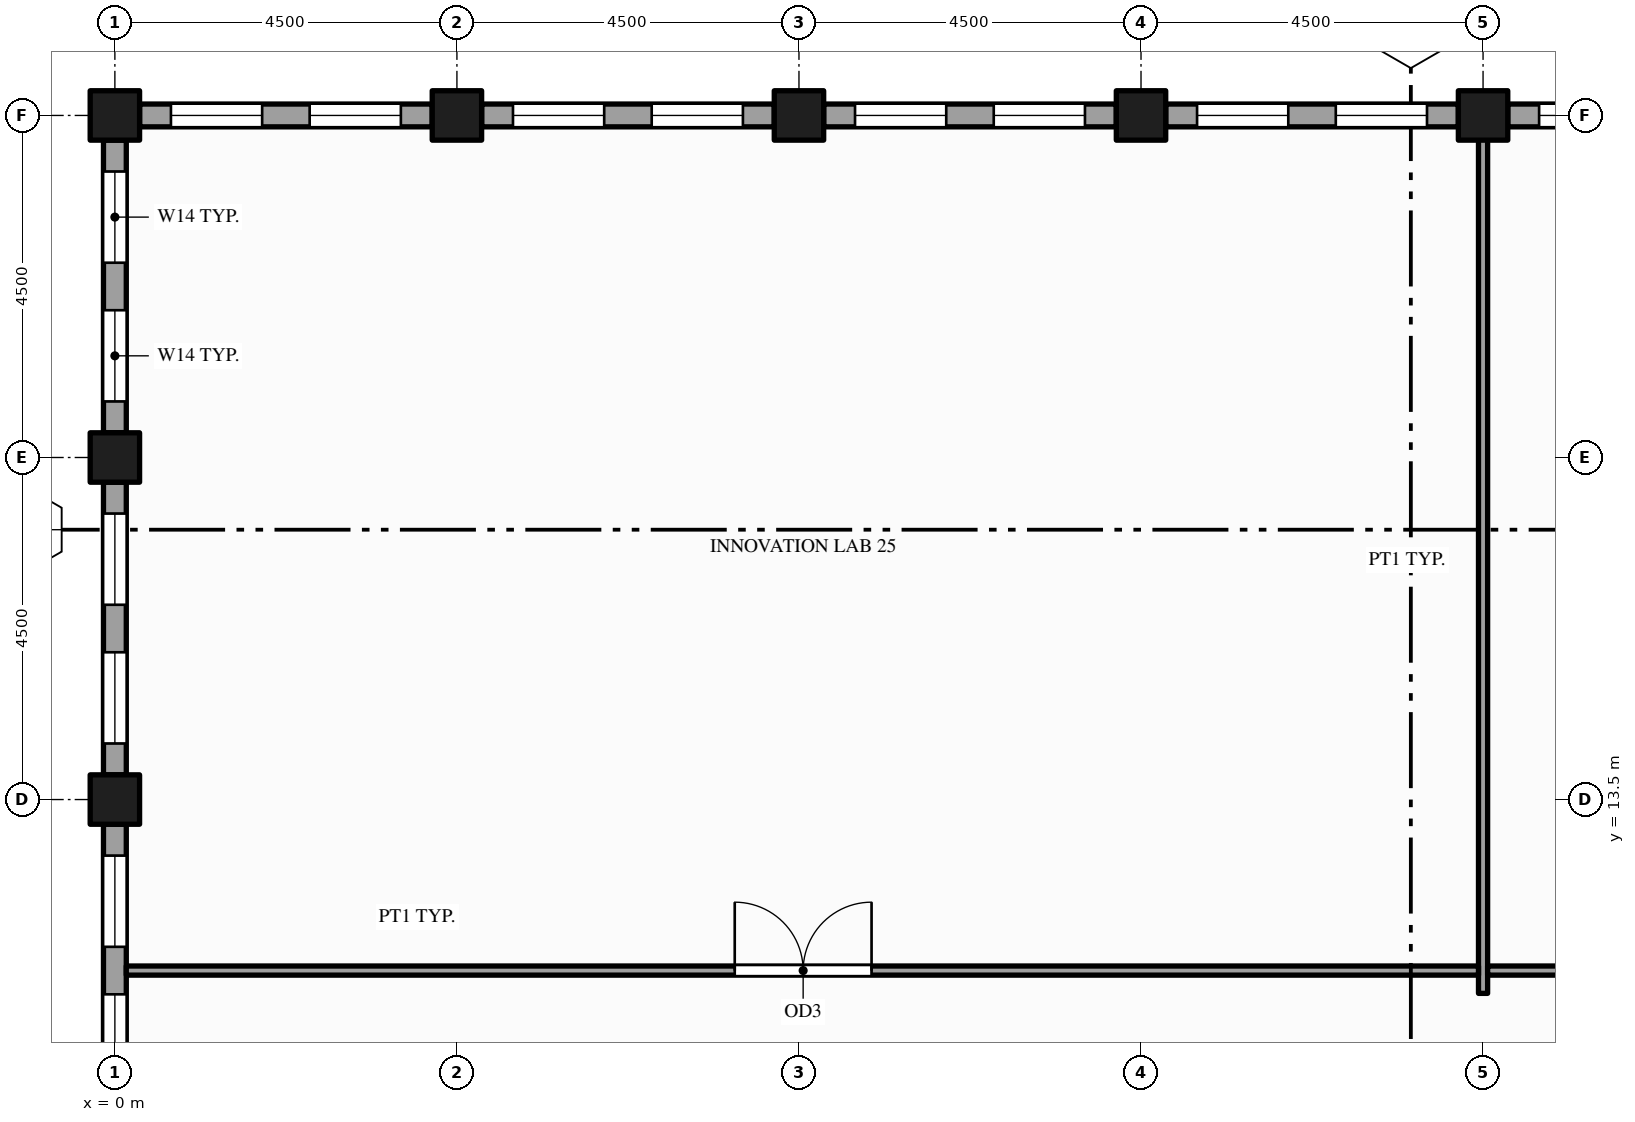
"""IFC4 building model, lengths in metres.
Left out: names, types, materials, properties, quantities, classifications, styles, units other than length and angle.
Written with IfcOpenShell. Run it as: python <this file> out.ifc"""

import sys

from ifc_helpers import new_model, si_unit, direction, frame, frame_2d, origin, origin_2d, place, context, subcontext, project, spatial, rectangle, hollow_rectangle, extrude, element, fill, save


model = new_model("IFC4")
c1 = context("Model", 3, precision=1e-05, world=origin(), true_north=direction((0.0, 1.0)))
c2 = subcontext(c1, "Body", "Model", "MODEL_VIEW")
j1 = project(units=[si_unit("LENGTHUNIT", "METRE"), si_unit("PLANEANGLEUNIT", "RADIAN")], contexts=[c1])
p1 = place(None, origin())
s1 = spatial("IfcSite", under=j1, at=p1, CompositionType="ELEMENT")
p2 = place(p1, origin())
s2 = spatial("IfcBuilding", under=s1, at=p2, CompositionType="ELEMENT")
p3 = place(p2, frame((0.0, 0.0, 249.0)))
s3 = spatial("IfcBuildingStorey", under=s2, at=p3, CompositionType="ELEMENT", Elevation=249.0)
for number, where, z_axis, x_axis in (
    (1, (0.0, 13.5, -0.15), (0.0, 0.0, 1.0), (1.0, 0.0, 0.0)),
    (2, (0.0, 18.0, -0.15), (0.0, 0.0, 1.0), (1.0, 0.0, 0.0)),
    (3, (0.0, 22.5, -0.15), (0.0, 0.0, 1.0), (1.0, 0.0, 0.0)),
    (4, (4.5, 22.5, -0.15), (0.0, 0.0, 1.0), (1.0, 0.0, 0.0)),
    (5, (9.0, 22.5, -0.15), (0.0, 0.0, 1.0), (1.0, 0.0, 0.0)),
    (6, (13.5, 22.5, -0.15), (0.0, 0.0, 1.0), (1.0, 0.0, 0.0)),
    (7, (18.0, 22.5, -0.15), (0.0, 0.0, 1.0), (1.0, 0.0, 0.0)),
):
    element("IfcColumn", number, at=place(p3, frame(where, z_axis=z_axis, x_axis=x_axis)), inside=s3, PredefinedType="COLUMN", context=c2, shape_type="SweptSolid", body=[
        extrude(hollow_rectangle(XDim=0.65, YDim=0.65, WallThickness=0.032, at=origin_2d()), origin(), (0.0, 0.0, 1.0), 4.0),
    ])
p4 = place(p3, frame((22.175, 22.5, 0.0), z_axis=(0.0, 0.0, 1.0), x_axis=(-1.0, 0.0, 0.0)))
e8 = element("IfcWall", 8, at=p4, inside=s3, PredefinedType="STANDARD", context=c2, shape_type="SweptSolid", body=[
    extrude(rectangle(XDim=3.85, YDim=0.3, at=frame_2d((1.925, 0.0))), origin(), (0.0, 0.0, 1.0), 2.87),
])
p5 = place(p4, frame((0.413, 0.0, 0.9)))
e9 = element("IfcOpeningElement", 9, at=p5, cuts=e8, PredefinedType="OPENING", context=c2, shape_type="SweptSolid", body=[
    extrude(rectangle(XDim=1.2, YDim=1.75, at=frame_2d((0.6, 0.875))), frame((0.0, 0.16, 0.0), z_axis=(0.0, -1.0, 0.0), x_axis=(1.0, 0.0, 0.0)), (0.0, 0.0, 1.0), 0.32),
])
p6 = place(p4, frame((2.238, 0.0, 0.9)))
e10 = element("IfcOpeningElement", 10, at=p6, cuts=e8, PredefinedType="OPENING", context=c2, shape_type="SweptSolid", body=[
    extrude(rectangle(XDim=1.2, YDim=1.75, at=frame_2d((0.6, 0.875))), frame((0.0, 0.16, 0.0), z_axis=(0.0, -1.0, 0.0), x_axis=(1.0, 0.0, 0.0)), (0.0, 0.0, 1.0), 0.32),
])
p7 = place(p3, frame((17.675, 22.5, 0.0), z_axis=(0.0, 0.0, 1.0), x_axis=(-1.0, 0.0, 0.0)))
e11 = element("IfcWall", 11, at=p7, inside=s3, PredefinedType="STANDARD", context=c2, shape_type="SweptSolid", body=[
    extrude(rectangle(XDim=3.85, YDim=0.3, at=frame_2d((1.925, 0.0))), origin(), (0.0, 0.0, 1.0), 2.87),
])
p8 = place(p7, frame((0.413, 0.0, 0.9)))
e12 = element("IfcOpeningElement", 12, at=p8, cuts=e11, PredefinedType="OPENING", context=c2, shape_type="SweptSolid", body=[
    extrude(rectangle(XDim=1.2, YDim=1.75, at=frame_2d((0.6, 0.875))), frame((0.0, 0.16, 0.0), z_axis=(0.0, -1.0, 0.0), x_axis=(1.0, 0.0, 0.0)), (0.0, 0.0, 1.0), 0.32),
])
p9 = place(p7, frame((2.238, 0.0, 0.9)))
e13 = element("IfcOpeningElement", 13, at=p9, cuts=e11, PredefinedType="OPENING", context=c2, shape_type="SweptSolid", body=[
    extrude(rectangle(XDim=1.2, YDim=1.75, at=frame_2d((0.6, 0.875))), frame((0.0, 0.16, 0.0), z_axis=(0.0, -1.0, 0.0), x_axis=(1.0, 0.0, 0.0)), (0.0, 0.0, 1.0), 0.32),
])
p10 = place(p3, frame((13.175, 22.5, 0.0), z_axis=(0.0, 0.0, 1.0), x_axis=(-1.0, 0.0, 0.0)))
e14 = element("IfcWall", 14, at=p10, inside=s3, PredefinedType="STANDARD", context=c2, shape_type="SweptSolid", body=[
    extrude(rectangle(XDim=3.85, YDim=0.3, at=frame_2d((1.925, 0.0))), origin(), (0.0, 0.0, 1.0), 2.87),
])
p11 = place(p10, frame((0.413, 0.0, 0.9)))
e15 = element("IfcOpeningElement", 15, at=p11, cuts=e14, PredefinedType="OPENING", context=c2, shape_type="SweptSolid", body=[
    extrude(rectangle(XDim=1.2, YDim=1.75, at=frame_2d((0.6, 0.875))), frame((0.0, 0.16, 0.0), z_axis=(0.0, -1.0, 0.0), x_axis=(1.0, 0.0, 0.0)), (0.0, 0.0, 1.0), 0.32),
])
p12 = place(p10, frame((2.238, 0.0, 0.9)))
e16 = element("IfcOpeningElement", 16, at=p12, cuts=e14, PredefinedType="OPENING", context=c2, shape_type="SweptSolid", body=[
    extrude(rectangle(XDim=1.2, YDim=1.75, at=frame_2d((0.6, 0.875))), frame((0.0, 0.16, 0.0), z_axis=(0.0, -1.0, 0.0), x_axis=(1.0, 0.0, 0.0)), (0.0, 0.0, 1.0), 0.32),
])
p13 = place(p3, frame((8.675, 22.5, 0.0), z_axis=(0.0, 0.0, 1.0), x_axis=(-1.0, 0.0, 0.0)))
e17 = element("IfcWall", 17, at=p13, inside=s3, PredefinedType="STANDARD", context=c2, shape_type="SweptSolid", body=[
    extrude(rectangle(XDim=3.85, YDim=0.3, at=frame_2d((1.925, 0.0))), origin(), (0.0, 0.0, 1.0), 2.87),
])
p14 = place(p13, frame((0.413, 0.0, 0.9)))
e18 = element("IfcOpeningElement", 18, at=p14, cuts=e17, PredefinedType="OPENING", context=c2, shape_type="SweptSolid", body=[
    extrude(rectangle(XDim=1.2, YDim=1.75, at=frame_2d((0.6, 0.875))), frame((0.0, 0.16, 0.0), z_axis=(0.0, -1.0, 0.0), x_axis=(1.0, 0.0, 0.0)), (0.0, 0.0, 1.0), 0.32),
])
p15 = place(p13, frame((2.238, 0.0, 0.9)))
e19 = element("IfcOpeningElement", 19, at=p15, cuts=e17, PredefinedType="OPENING", context=c2, shape_type="SweptSolid", body=[
    extrude(rectangle(XDim=1.2, YDim=1.75, at=frame_2d((0.6, 0.875))), frame((0.0, 0.16, 0.0), z_axis=(0.0, -1.0, 0.0), x_axis=(1.0, 0.0, 0.0)), (0.0, 0.0, 1.0), 0.32),
])
p16 = place(p3, frame((4.175, 22.5, 0.0), z_axis=(0.0, 0.0, 1.0), x_axis=(-1.0, 0.0, 0.0)))
e20 = element("IfcWall", 20, at=p16, inside=s3, PredefinedType="STANDARD", context=c2, shape_type="SweptSolid", body=[
    extrude(rectangle(XDim=3.85, YDim=0.3, at=frame_2d((1.925, 0.0))), origin(), (0.0, 0.0, 1.0), 2.87),
])
p17 = place(p16, frame((0.413, 0.0, 0.9)))
e21 = element("IfcOpeningElement", 21, at=p17, cuts=e20, PredefinedType="OPENING", context=c2, shape_type="SweptSolid", body=[
    extrude(rectangle(XDim=1.2, YDim=1.75, at=frame_2d((0.6, 0.875))), frame((0.0, 0.16, 0.0), z_axis=(0.0, -1.0, 0.0), x_axis=(1.0, 0.0, 0.0)), (0.0, 0.0, 1.0), 0.32),
])
p18 = place(p16, frame((2.238, 0.0, 0.9)))
e22 = element("IfcOpeningElement", 22, at=p18, cuts=e20, PredefinedType="OPENING", context=c2, shape_type="SweptSolid", body=[
    extrude(rectangle(XDim=1.2, YDim=1.75, at=frame_2d((0.6, 0.875))), frame((0.0, 0.16, 0.0), z_axis=(0.0, -1.0, 0.0), x_axis=(1.0, 0.0, 0.0)), (0.0, 0.0, 1.0), 0.32),
])
p19 = place(p3, frame((0.0, 22.175, 0.0), z_axis=(0.0, 0.0, 1.0), x_axis=(0.0, -1.0, 0.0)))
e23 = element("IfcWall", 23, at=p19, inside=s3, PredefinedType="STANDARD", context=c2, shape_type="SweptSolid", body=[
    extrude(rectangle(XDim=3.85, YDim=0.3, at=frame_2d((1.925, 0.0))), origin(), (0.0, 0.0, 1.0), 3.162),
])
p20 = place(p19, frame((0.413, 0.0, 0.9)))
e24 = element("IfcOpeningElement", 24, at=p20, cuts=e23, PredefinedType="OPENING", context=c2, shape_type="SweptSolid", body=[
    extrude(rectangle(XDim=1.2, YDim=2.0, at=frame_2d((0.6, 1.0))), frame((0.0, 0.16, 0.0), z_axis=(0.0, -1.0, 0.0), x_axis=(1.0, 0.0, 0.0)), (0.0, 0.0, 1.0), 0.32),
])
p21 = place(p19, frame((2.238, 0.0, 0.9)))
e25 = element("IfcOpeningElement", 25, at=p21, cuts=e23, PredefinedType="OPENING", context=c2, shape_type="SweptSolid", body=[
    extrude(rectangle(XDim=1.2, YDim=2.0, at=frame_2d((0.6, 1.0))), frame((0.0, 0.16, 0.0), z_axis=(0.0, -1.0, 0.0), x_axis=(1.0, 0.0, 0.0)), (0.0, 0.0, 1.0), 0.32),
])
p22 = place(p3, frame((0.0, 17.675, 0.0), z_axis=(0.0, 0.0, 1.0), x_axis=(0.0, -1.0, 0.0)))
e26 = element("IfcWall", 26, at=p22, inside=s3, PredefinedType="STANDARD", context=c2, shape_type="SweptSolid", body=[
    extrude(rectangle(XDim=3.85, YDim=0.3, at=frame_2d((1.925, 0.0))), origin(), (0.0, 0.0, 1.0), 3.162),
])
p23 = place(p22, frame((0.413, 0.0, 0.9)))
e27 = element("IfcOpeningElement", 27, at=p23, cuts=e26, PredefinedType="OPENING", context=c2, shape_type="SweptSolid", body=[
    extrude(rectangle(XDim=1.2, YDim=2.0, at=frame_2d((0.6, 1.0))), frame((0.0, 0.16, 0.0), z_axis=(0.0, -1.0, 0.0), x_axis=(1.0, 0.0, 0.0)), (0.0, 0.0, 1.0), 0.32),
])
p24 = place(p22, frame((2.238, 0.0, 0.9)))
e28 = element("IfcOpeningElement", 28, at=p24, cuts=e26, PredefinedType="OPENING", context=c2, shape_type="SweptSolid", body=[
    extrude(rectangle(XDim=1.2, YDim=2.0, at=frame_2d((0.6, 1.0))), frame((0.0, 0.16, 0.0), z_axis=(0.0, -1.0, 0.0), x_axis=(1.0, 0.0, 0.0)), (0.0, 0.0, 1.0), 0.32),
])
p25 = place(p3, frame((0.0, 13.175, 0.0), z_axis=(0.0, 0.0, 1.0), x_axis=(0.0, -1.0, 0.0)))
e29 = element("IfcWall", 29, at=p25, inside=s3, PredefinedType="STANDARD", context=c2, shape_type="SweptSolid", body=[
    extrude(rectangle(XDim=3.85, YDim=0.3, at=frame_2d((1.925, 0.0))), origin(), (0.0, 0.0, 1.0), 3.162),
])
p26 = place(p25, frame((0.413, 0.0, 0.9)))
e30 = element("IfcOpeningElement", 30, at=p26, cuts=e29, PredefinedType="OPENING", context=c2, shape_type="SweptSolid", body=[
    extrude(rectangle(XDim=1.2, YDim=2.0, at=frame_2d((0.6, 1.0))), frame((0.0, 0.16, 0.0), z_axis=(0.0, -1.0, 0.0), x_axis=(1.0, 0.0, 0.0)), (0.0, 0.0, 1.0), 0.32),
])
p27 = place(p25, frame((2.238, 0.0, 0.9)))
e31 = element("IfcOpeningElement", 31, at=p27, cuts=e29, PredefinedType="OPENING", context=c2, shape_type="SweptSolid", body=[
    extrude(rectangle(XDim=1.2, YDim=2.0, at=frame_2d((0.6, 1.0))), frame((0.0, 0.16, 0.0), z_axis=(0.0, -1.0, 0.0), x_axis=(1.0, 0.0, 0.0)), (0.0, 0.0, 1.0), 0.32),
])
p28 = place(p3, frame((18.0, 10.95, 0.0), z_axis=(0.0, 0.0, 1.0), x_axis=(0.0, 1.0, 0.0)))
e32 = element("IfcWall", 32, at=p28, inside=s3, PredefinedType="PARTITIONING", context=c2, shape_type="SweptSolid", body=[
    extrude(rectangle(XDim=11.4, YDim=0.12, at=frame_2d((5.7, 0.0))), origin(), (0.0, 0.0, 1.0), 2.87),
])
p29 = place(p3, frame((0.15, 11.25, 0.0), z_axis=(0.0, 0.0, 1.0), x_axis=(1.0, 0.0, 0.0)))
e33 = element("IfcWall", 33, at=p29, inside=s3, PredefinedType="PARTITIONING", context=c2, shape_type="SweptSolid", body=[
    extrude(rectangle(XDim=17.79, YDim=0.12, at=frame_2d((8.895, 0.0))), origin(), (0.0, 0.0, 1.0), 2.87),
])
p30 = place(p29, frame((8.005, 0.0, 0.0)))
e34 = element("IfcOpeningElement", 34, at=p30, cuts=e33, PredefinedType="OPENING", context=c2, shape_type="SweptSolid", body=[
    extrude(rectangle(XDim=1.8, YDim=2.1, at=frame_2d((0.9, 1.05))), frame((0.0, 0.07, 0.0), z_axis=(0.0, -1.0, 0.0), x_axis=(1.0, 0.0, 0.0)), (0.0, 0.0, 1.0), 0.14),
])
p31 = place(p3, frame((18.06, 11.25, 0.0), z_axis=(0.0, 0.0, 1.0), x_axis=(1.0, 0.0, 0.0)))
e35 = element("IfcWall", 35, at=p31, inside=s3, PredefinedType="PARTITIONING", context=c2, shape_type="SweptSolid", body=[
    extrude(rectangle(XDim=6.63, YDim=0.12, at=frame_2d((3.315, 0.0))), origin(), (0.0, 0.0, 1.0), 2.87),
])
p32 = place(p31, frame((2.815, 0.0, 0.0)))
e36 = element("IfcOpeningElement", 36, at=p32, cuts=e35, PredefinedType="OPENING", context=c2, shape_type="SweptSolid", body=[
    extrude(rectangle(XDim=1.0, YDim=2.1, at=frame_2d((0.5, 1.05))), frame((0.0, 0.07, 0.0), z_axis=(0.0, -1.0, 0.0), x_axis=(1.0, 0.0, 0.0)), (0.0, 0.0, 1.0), 0.14),
])
p33 = place(p6, origin())
e37 = element("IfcWindow", 37, at=p33, inside=s3, PartitioningType="SINGLE_PANEL", PredefinedType="WINDOW", context=c2, shape_type="SweptSolid", body=[
    extrude(rectangle(XDim=1.2, YDim=1.75, at=frame_2d((0.6, 0.875))), frame((0.0, 0.03, 0.0), z_axis=(0.0, -1.0, 0.0), x_axis=(1.0, 0.0, 0.0)), (0.0, 0.0, 1.0), 0.06),
])
fill(e10, e37)
p34 = place(p8, origin())
e38 = element("IfcWindow", 38, at=p34, inside=s3, PartitioningType="SINGLE_PANEL", PredefinedType="WINDOW", context=c2, shape_type="SweptSolid", body=[
    extrude(rectangle(XDim=1.2, YDim=1.75, at=frame_2d((0.6, 0.875))), frame((0.0, 0.03, 0.0), z_axis=(0.0, -1.0, 0.0), x_axis=(1.0, 0.0, 0.0)), (0.0, 0.0, 1.0), 0.06),
])
fill(e12, e38)
p35 = place(p9, origin())
e39 = element("IfcWindow", 39, at=p35, inside=s3, PartitioningType="SINGLE_PANEL", PredefinedType="WINDOW", context=c2, shape_type="SweptSolid", body=[
    extrude(rectangle(XDim=1.2, YDim=1.75, at=frame_2d((0.6, 0.875))), frame((0.0, 0.03, 0.0), z_axis=(0.0, -1.0, 0.0), x_axis=(1.0, 0.0, 0.0)), (0.0, 0.0, 1.0), 0.06),
])
fill(e13, e39)
p36 = place(p11, origin())
e40 = element("IfcWindow", 40, at=p36, inside=s3, PartitioningType="SINGLE_PANEL", PredefinedType="WINDOW", context=c2, shape_type="SweptSolid", body=[
    extrude(rectangle(XDim=1.2, YDim=1.75, at=frame_2d((0.6, 0.875))), frame((0.0, 0.03, 0.0), z_axis=(0.0, -1.0, 0.0), x_axis=(1.0, 0.0, 0.0)), (0.0, 0.0, 1.0), 0.06),
])
fill(e15, e40)
p37 = place(p12, origin())
e41 = element("IfcWindow", 41, at=p37, inside=s3, PartitioningType="SINGLE_PANEL", PredefinedType="WINDOW", context=c2, shape_type="SweptSolid", body=[
    extrude(rectangle(XDim=1.2, YDim=1.75, at=frame_2d((0.6, 0.875))), frame((0.0, 0.03, 0.0), z_axis=(0.0, -1.0, 0.0), x_axis=(1.0, 0.0, 0.0)), (0.0, 0.0, 1.0), 0.06),
])
fill(e16, e41)
p38 = place(p14, origin())
e42 = element("IfcWindow", 42, at=p38, inside=s3, PartitioningType="SINGLE_PANEL", PredefinedType="WINDOW", context=c2, shape_type="SweptSolid", body=[
    extrude(rectangle(XDim=1.2, YDim=1.75, at=frame_2d((0.6, 0.875))), frame((0.0, 0.03, 0.0), z_axis=(0.0, -1.0, 0.0), x_axis=(1.0, 0.0, 0.0)), (0.0, 0.0, 1.0), 0.06),
])
fill(e18, e42)
p39 = place(p15, origin())
e43 = element("IfcWindow", 43, at=p39, inside=s3, PartitioningType="SINGLE_PANEL", PredefinedType="WINDOW", context=c2, shape_type="SweptSolid", body=[
    extrude(rectangle(XDim=1.2, YDim=1.75, at=frame_2d((0.6, 0.875))), frame((0.0, 0.03, 0.0), z_axis=(0.0, -1.0, 0.0), x_axis=(1.0, 0.0, 0.0)), (0.0, 0.0, 1.0), 0.06),
])
fill(e19, e43)
p40 = place(p17, origin())
e44 = element("IfcWindow", 44, at=p40, inside=s3, PartitioningType="SINGLE_PANEL", PredefinedType="WINDOW", context=c2, shape_type="SweptSolid", body=[
    extrude(rectangle(XDim=1.2, YDim=1.75, at=frame_2d((0.6, 0.875))), frame((0.0, 0.03, 0.0), z_axis=(0.0, -1.0, 0.0), x_axis=(1.0, 0.0, 0.0)), (0.0, 0.0, 1.0), 0.06),
])
fill(e21, e44)
p41 = place(p18, origin())
e45 = element("IfcWindow", 45, at=p41, inside=s3, PartitioningType="SINGLE_PANEL", PredefinedType="WINDOW", context=c2, shape_type="SweptSolid", body=[
    extrude(rectangle(XDim=1.2, YDim=1.75, at=frame_2d((0.6, 0.875))), frame((0.0, 0.03, 0.0), z_axis=(0.0, -1.0, 0.0), x_axis=(1.0, 0.0, 0.0)), (0.0, 0.0, 1.0), 0.06),
])
fill(e22, e45)
p42 = place(p20, origin())
e46 = element("IfcWindow", 46, at=p42, inside=s3, PartitioningType="SINGLE_PANEL", PredefinedType="WINDOW", context=c2, shape_type="SweptSolid", body=[
    extrude(rectangle(XDim=1.2, YDim=2.0, at=frame_2d((0.6, 1.0))), frame((0.0, 0.03, 0.0), z_axis=(0.0, -1.0, 0.0), x_axis=(1.0, 0.0, 0.0)), (0.0, 0.0, 1.0), 0.06),
])
fill(e24, e46)
p43 = place(p21, origin())
e47 = element("IfcWindow", 47, at=p43, inside=s3, PartitioningType="SINGLE_PANEL", PredefinedType="WINDOW", context=c2, shape_type="SweptSolid", body=[
    extrude(rectangle(XDim=1.2, YDim=2.0, at=frame_2d((0.6, 1.0))), frame((0.0, 0.03, 0.0), z_axis=(0.0, -1.0, 0.0), x_axis=(1.0, 0.0, 0.0)), (0.0, 0.0, 1.0), 0.06),
])
fill(e25, e47)
p44 = place(p23, origin())
e48 = element("IfcWindow", 48, at=p44, inside=s3, PartitioningType="SINGLE_PANEL", PredefinedType="WINDOW", context=c2, shape_type="SweptSolid", body=[
    extrude(rectangle(XDim=1.2, YDim=2.0, at=frame_2d((0.6, 1.0))), frame((0.0, 0.03, 0.0), z_axis=(0.0, -1.0, 0.0), x_axis=(1.0, 0.0, 0.0)), (0.0, 0.0, 1.0), 0.06),
])
fill(e27, e48)
p45 = place(p24, origin())
e49 = element("IfcWindow", 49, at=p45, inside=s3, PartitioningType="SINGLE_PANEL", PredefinedType="WINDOW", context=c2, shape_type="SweptSolid", body=[
    extrude(rectangle(XDim=1.2, YDim=2.0, at=frame_2d((0.6, 1.0))), frame((0.0, 0.03, 0.0), z_axis=(0.0, -1.0, 0.0), x_axis=(1.0, 0.0, 0.0)), (0.0, 0.0, 1.0), 0.06),
])
fill(e28, e49)
p46 = place(p26, origin())
e50 = element("IfcWindow", 50, at=p46, inside=s3, PartitioningType="SINGLE_PANEL", PredefinedType="WINDOW", context=c2, shape_type="SweptSolid", body=[
    extrude(rectangle(XDim=1.2, YDim=2.0, at=frame_2d((0.6, 1.0))), frame((0.0, 0.03, 0.0), z_axis=(0.0, -1.0, 0.0), x_axis=(1.0, 0.0, 0.0)), (0.0, 0.0, 1.0), 0.06),
])
fill(e30, e50)
p47 = place(p27, origin())
e51 = element("IfcWindow", 51, at=p47, inside=s3, PartitioningType="SINGLE_PANEL", PredefinedType="WINDOW", context=c2, shape_type="SweptSolid", body=[
    extrude(rectangle(XDim=1.2, YDim=2.0, at=frame_2d((0.6, 1.0))), frame((0.0, 0.03, 0.0), z_axis=(0.0, -1.0, 0.0), x_axis=(1.0, 0.0, 0.0)), (0.0, 0.0, 1.0), 0.06),
])
fill(e31, e51)
p48 = place(p30, origin())
e52 = element("IfcDoor", 52, at=p48, inside=s3, OperationType="DOUBLE_DOOR_SINGLE_SWING", PredefinedType="DOOR", context=c2, shape_type="SweptSolid", body=[
    extrude(rectangle(XDim=1.8, YDim=2.1, at=frame_2d((0.9, 1.05))), frame((0.0, 0.025, 0.0), z_axis=(0.0, -1.0, 0.0), x_axis=(1.0, 0.0, 0.0)), (0.0, 0.0, 1.0), 0.05),
])
fill(e34, e52)
save(model, sys.argv[1])
